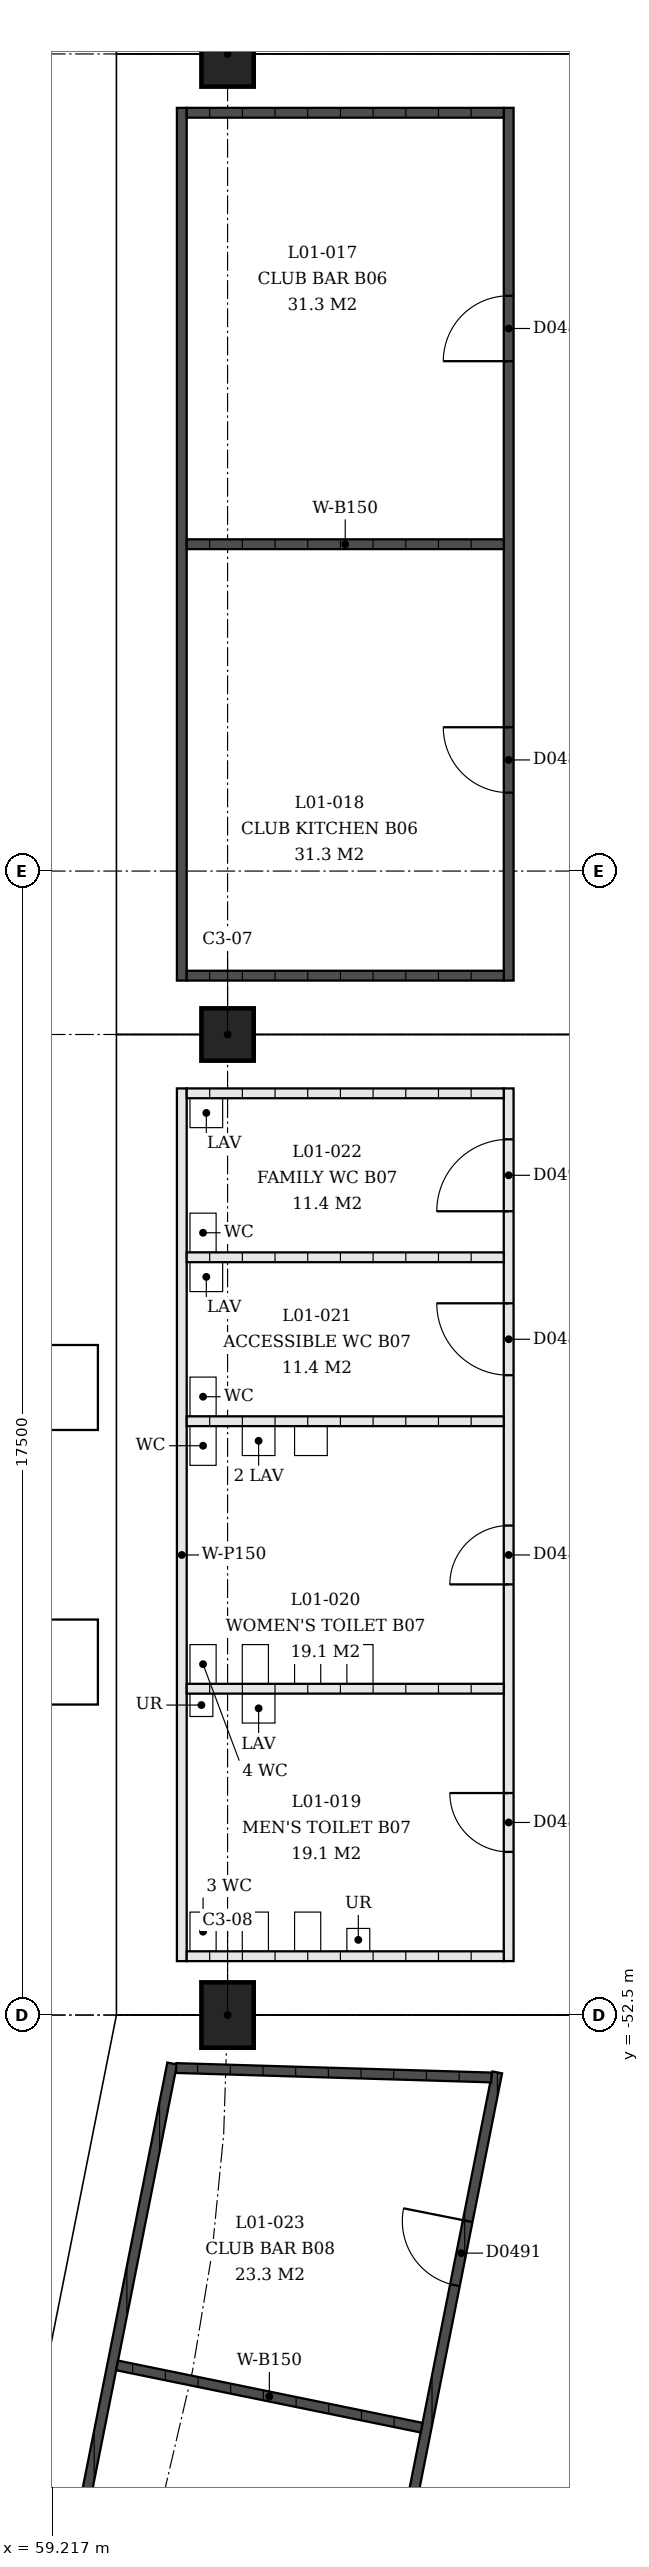
"""IFC4 building model, lengths in metres.
Left out: names, types, materials, properties, quantities, classifications, styles, units other than length and angle.
Written with IfcOpenShell. Run it as: python <this file> out.ifc"""

import sys

from ifc_helpers import new_model, si_unit, direction, frame, frame_2d, origin, origin_2d, place, context, subcontext, project, spatial, rectangle, extrude, element, fill, save


model = new_model("IFC4")
c1 = context("Model", 3, precision=1e-05, world=origin(), true_north=direction((0.0, 1.0)))
c2 = subcontext(c1, "Body", "Model", "MODEL_VIEW")
j1 = project(units=[si_unit("LENGTHUNIT", "METRE"), si_unit("PLANEANGLEUNIT", "RADIAN")], contexts=[c1])
p1 = place(None, origin())
s1 = spatial("IfcSite", under=j1, at=p1, CompositionType="ELEMENT")
p2 = place(p1, origin())
s2 = spatial("IfcBuilding", under=s1, at=p2, CompositionType="ELEMENT")
p3 = place(p2, frame((0.0, 0.0, 4.5)))
s3 = spatial("IfcBuildingStorey", under=s2, at=p3, CompositionType="ELEMENT", Elevation=4.5)
p4 = place(p3, frame((61.9, -22.5, 0.0), z_axis=(0.0, 0.0, 1.0), x_axis=(0.0, 1.0, 0.0)))
e1 = element("IfcColumn", 1, at=p4, inside=s3, PredefinedType="COLUMN", context=c2, shape_type="SweptSolid", body=[
    extrude(rectangle(XDim=1.0, YDim=0.8, at=origin_2d()), origin(), (0.0, 0.0, 1.0), 4.5),
])
p5 = place(p3, frame((61.9, -37.5, 0.0), z_axis=(0.0, 0.0, 1.0), x_axis=(0.0, 1.0, 0.0)))
e2 = element("IfcColumn", 2, at=p5, inside=s3, PredefinedType="COLUMN", context=c2, shape_type="SweptSolid", body=[
    extrude(rectangle(XDim=0.8, YDim=0.8, at=origin_2d()), origin(), (0.0, 0.0, 1.0), 4.5),
])
p6 = place(p3, frame((61.9, -52.5, 0.0), z_axis=(0.0, 0.0, 1.0), x_axis=(0.0, 1.0, 0.0)))
e3 = element("IfcColumn", 3, at=p6, inside=s3, PredefinedType="COLUMN", context=c2, shape_type="SweptSolid", body=[
    extrude(rectangle(XDim=1.0, YDim=0.8, at=origin_2d()), origin(), (0.0, 0.0, 1.0), 4.5),
])
p7 = place(p3, frame((61.2, -23.325, 0.0), z_axis=(0.0, 0.0, 1.0), x_axis=(0.0, -1.0, 0.0)))
e4 = element("IfcWall", 4, at=p7, inside=s3, PredefinedType="SOLIDWALL", context=c2, shape_type="SweptSolid", body=[
    extrude(rectangle(XDim=13.35, YDim=0.15, at=frame_2d((6.675, 0.0))), origin(), (0.0, 0.0, 1.0), 3.0),
])
p8 = place(p3, frame((66.2, -23.325, 0.0), z_axis=(0.0, 0.0, 1.0), x_axis=(0.0, -1.0, 0.0)))
e5 = element("IfcWall", 5, at=p8, inside=s3, PredefinedType="SOLIDWALL", context=c2, shape_type="SweptSolid", body=[
    extrude(rectangle(XDim=13.35, YDim=0.15, at=frame_2d((6.675, 0.0))), origin(), (0.0, 0.0, 1.0), 3.0),
])
p9 = place(p8, frame((2.875, 0.0, 0.0)))
e6 = element("IfcOpeningElement", 6, at=p9, cuts=e5, PredefinedType="OPENING", context=c2, shape_type="SweptSolid", body=[
    extrude(rectangle(XDim=1.0, YDim=2.1, at=frame_2d((0.5, 1.05))), frame((0.0, 0.075, 0.0), z_axis=(0.0, -1.0, 0.0), x_axis=(1.0, 0.0, 0.0)), (0.0, 0.0, 1.0), 0.15),
])
p10 = place(p8, frame((9.475, 0.0, 0.0)))
e7 = element("IfcOpeningElement", 7, at=p10, cuts=e5, PredefinedType="OPENING", context=c2, shape_type="SweptSolid", body=[
    extrude(rectangle(XDim=1.0, YDim=2.1, at=frame_2d((0.5, 1.05))), frame((0.0, 0.075, 0.0), z_axis=(0.0, -1.0, 0.0), x_axis=(1.0, 0.0, 0.0)), (0.0, 0.0, 1.0), 0.15),
])
for number, where, z_axis, x_axis in (
    (8, (61.275, -23.4, 0.0), (0.0, 0.0, 1.0), (1.0, 0.0, 0.0)),
    (9, (61.275, -30.0, 0.0), (0.0, 0.0, 1.0), (1.0, 0.0, 0.0)),
    (10, (61.275, -36.6, 0.0), (0.0, 0.0, 1.0), (1.0, 0.0, 0.0)),
):
    element("IfcWall", number, at=place(p3, frame(where, z_axis=z_axis, x_axis=x_axis)), inside=s3, PredefinedType="SOLIDWALL", context=c2, shape_type="SweptSolid", body=[
        extrude(rectangle(XDim=4.85, YDim=0.15, at=frame_2d((2.425, 0.0))), origin(), (0.0, 0.0, 1.0), 3.0),
    ])
p11 = place(p3, frame((61.2, -51.675, 0.0), z_axis=(0.0, 0.0, 1.0), x_axis=(0.0, 1.0, 0.0)))
e11 = element("IfcWall", 11, at=p11, inside=s3, PredefinedType="PARTITIONING", context=c2, shape_type="SweptSolid", body=[
    extrude(rectangle(XDim=13.35, YDim=0.15, at=frame_2d((6.675, 0.0))), origin(), (0.0, 0.0, 1.0), 3.0),
])
p12 = place(p3, frame((66.2, -51.675, 0.0), z_axis=(0.0, 0.0, 1.0), x_axis=(0.0, 1.0, 0.0)))
e12 = element("IfcWall", 12, at=p12, inside=s3, PredefinedType="PARTITIONING", context=c2, shape_type="SweptSolid", body=[
    extrude(rectangle(XDim=13.35, YDim=0.15, at=frame_2d((6.675, 0.0))), origin(), (0.0, 0.0, 1.0), 3.0),
])
p13 = place(p12, frame((1.671, 0.0, 0.0)))
e13 = element("IfcOpeningElement", 13, at=p13, cuts=e12, PredefinedType="OPENING", context=c2, shape_type="SweptSolid", body=[
    extrude(rectangle(XDim=0.9, YDim=2.1, at=frame_2d((0.45, 1.05))), frame((0.0, 0.075, 0.0), z_axis=(0.0, -1.0, 0.0), x_axis=(1.0, 0.0, 0.0)), (0.0, 0.0, 1.0), 0.15),
])
p14 = place(p12, frame((5.763, 0.0, 0.0)))
e14 = element("IfcOpeningElement", 14, at=p14, cuts=e12, PredefinedType="OPENING", context=c2, shape_type="SweptSolid", body=[
    extrude(rectangle(XDim=0.9, YDim=2.1, at=frame_2d((0.45, 1.05))), frame((0.0, 0.075, 0.0), z_axis=(0.0, -1.0, 0.0), x_axis=(1.0, 0.0, 0.0)), (0.0, 0.0, 1.0), 0.15),
])
p15 = place(p12, frame((8.963, 0.0, 0.0)))
e15 = element("IfcOpeningElement", 15, at=p15, cuts=e12, PredefinedType="OPENING", context=c2, shape_type="SweptSolid", body=[
    extrude(rectangle(XDim=1.1, YDim=2.1, at=frame_2d((0.55, 1.05))), frame((0.0, 0.075, 0.0), z_axis=(0.0, -1.0, 0.0), x_axis=(1.0, 0.0, 0.0)), (0.0, 0.0, 1.0), 0.15),
])
p16 = place(p12, frame((11.471, 0.0, 0.0)))
e16 = element("IfcOpeningElement", 16, at=p16, cuts=e12, PredefinedType="OPENING", context=c2, shape_type="SweptSolid", body=[
    extrude(rectangle(XDim=1.1, YDim=2.1, at=frame_2d((0.55, 1.05))), frame((0.0, 0.075, 0.0), z_axis=(0.0, -1.0, 0.0), x_axis=(1.0, 0.0, 0.0)), (0.0, 0.0, 1.0), 0.15),
])
for number, where, z_axis, x_axis in (
    (17, (61.275, -51.6, 0.0), (0.0, 0.0, 1.0), (1.0, 0.0, 0.0)),
    (18, (61.275, -47.508, 0.0), (0.0, 0.0, 1.0), (1.0, 0.0, 0.0)),
    (19, (61.275, -43.416, 0.0), (0.0, 0.0, 1.0), (1.0, 0.0, 0.0)),
    (20, (61.275, -40.908, 0.0), (0.0, 0.0, 1.0), (1.0, 0.0, 0.0)),
    (21, (61.275, -38.4, 0.0), (0.0, 0.0, 1.0), (1.0, 0.0, 0.0)),
):
    element("IfcWall", number, at=place(p3, frame(where, z_axis=z_axis, x_axis=x_axis)), inside=s3, PredefinedType="PARTITIONING", context=c2, shape_type="SweptSolid", body=[
        extrude(rectangle(XDim=4.85, YDim=0.15, at=frame_2d((2.425, 0.0))), origin(), (0.0, 0.0, 1.0), 3.0),
    ])
p17 = place(p3, frame((61.052, -53.241, 0.0), z_axis=(0.0, 0.0, 1.0), x_axis=(-0.195075759432, -0.980788176969, 0.0)))
e22 = element("IfcWall", 22, at=p17, inside=s3, PredefinedType="SOLIDWALL", context=c2, shape_type="SweptSolid", body=[
    extrude(rectangle(XDim=9.388, YDim=0.15, at=frame_2d((4.694, 0.0))), origin(), (0.0, 0.0, 1.0), 3.0),
])
p18 = place(p3, frame((66.025, -53.377, 0.0), z_axis=(0.0, 0.0, 1.0), x_axis=(-0.195076764682, -0.980787977027, 0.0)))
e23 = element("IfcWall", 23, at=p18, inside=s3, PredefinedType="SOLIDWALL", context=c2, shape_type="SweptSolid", body=[
    extrude(rectangle(XDim=11.114, YDim=0.15, at=frame_2d((5.557, 0.0))), origin(), (0.0, 0.0, 1.0), 3.0),
])
p19 = place(p18, frame((2.319, 0.0, 0.0)))
e24 = element("IfcOpeningElement", 24, at=p19, cuts=e23, PredefinedType="OPENING", context=c2, shape_type="SweptSolid", body=[
    extrude(rectangle(XDim=1.0, YDim=2.1, at=frame_2d((0.5, 1.05))), frame((0.0, 0.075, 0.0), z_axis=(0.0, -1.0, 0.0), x_axis=(1.0, 0.0, 0.0)), (0.0, 0.0, 1.0), 0.15),
])
p20 = place(p18, frame((7.794, 0.0, 0.0)))
e25 = element("IfcOpeningElement", 25, at=p20, cuts=e23, PredefinedType="OPENING", context=c2, shape_type="SweptSolid", body=[
    extrude(rectangle(XDim=1.0, YDim=2.1, at=frame_2d((0.5, 1.05))), frame((0.0, 0.075, 0.0), z_axis=(0.0, -1.0, 0.0), x_axis=(1.0, 0.0, 0.0)), (0.0, 0.0, 1.0), 0.15),
])
p21 = place(p3, frame((61.114, -53.311, 0.0), z_axis=(0.0, 0.0, 1.0), x_axis=(0.999552485488, -0.02991368842, 0.0)))
e26 = element("IfcWall", 26, at=p21, inside=s3, PredefinedType="SOLIDWALL", context=c2, shape_type="SweptSolid", body=[
    extrude(rectangle(XDim=4.823, YDim=0.15, at=frame_2d((2.412, 0.0))), origin(), (0.0, 0.0, 1.0), 3.0),
])
p22 = place(p3, frame((60.209, -57.859, 0.0), z_axis=(0.0, 0.0, 1.0), x_axis=(0.979720657149, -0.200368245875, 0.0)))
e27 = element("IfcWall", 27, at=p22, inside=s3, PredefinedType="SOLIDWALL", context=c2, shape_type="SweptSolid", body=[
    extrude(rectangle(XDim=4.757, YDim=0.15, at=frame_2d((2.378, 0.0))), origin(), (0.0, 0.0, 1.0), 3.0),
])
p23 = place(p9, origin())
e28 = element("IfcDoor", 28, at=p23, inside=s3, OperationType="SINGLE_SWING_RIGHT", PredefinedType="DOOR", context=c2, shape_type="SweptSolid", body=[
    extrude(rectangle(XDim=1.0, YDim=2.1, at=frame_2d((0.5, 1.05))), frame((0.0, 0.025, 0.0), z_axis=(0.0, -1.0, 0.0), x_axis=(1.0, 0.0, 0.0)), (0.0, 0.0, 1.0), 0.05),
])
fill(e6, e28)
p24 = place(p10, origin())
e29 = element("IfcDoor", 29, at=p24, inside=s3, OperationType="SINGLE_SWING_LEFT", PredefinedType="DOOR", context=c2, shape_type="SweptSolid", body=[
    extrude(rectangle(XDim=1.0, YDim=2.1, at=frame_2d((0.5, 1.05))), frame((0.0, 0.025, 0.0), z_axis=(0.0, -1.0, 0.0), x_axis=(1.0, 0.0, 0.0)), (0.0, 0.0, 1.0), 0.05),
])
fill(e7, e29)
p25 = place(p13, origin())
e30 = element("IfcDoor", 30, at=p25, inside=s3, OperationType="SINGLE_SWING_LEFT", PredefinedType="DOOR", context=c2, shape_type="SweptSolid", body=[
    extrude(rectangle(XDim=0.9, YDim=2.1, at=frame_2d((0.45, 1.05))), frame((0.0, 0.025, 0.0), z_axis=(0.0, -1.0, 0.0), x_axis=(1.0, 0.0, 0.0)), (0.0, 0.0, 1.0), 0.05),
])
fill(e13, e30)
p26 = place(p14, origin())
e31 = element("IfcDoor", 31, at=p26, inside=s3, OperationType="SINGLE_SWING_RIGHT", PredefinedType="DOOR", context=c2, shape_type="SweptSolid", body=[
    extrude(rectangle(XDim=0.9, YDim=2.1, at=frame_2d((0.45, 1.05))), frame((0.0, 0.025, 0.0), z_axis=(0.0, -1.0, 0.0), x_axis=(1.0, 0.0, 0.0)), (0.0, 0.0, 1.0), 0.05),
])
fill(e14, e31)
p27 = place(p15, origin())
e32 = element("IfcDoor", 32, at=p27, inside=s3, OperationType="SINGLE_SWING_LEFT", PredefinedType="DOOR", context=c2, shape_type="SweptSolid", body=[
    extrude(rectangle(XDim=1.1, YDim=2.1, at=frame_2d((0.55, 1.05))), frame((0.0, 0.025, 0.0), z_axis=(0.0, -1.0, 0.0), x_axis=(1.0, 0.0, 0.0)), (0.0, 0.0, 1.0), 0.05),
])
fill(e15, e32)
p28 = place(p16, origin())
e33 = element("IfcDoor", 33, at=p28, inside=s3, OperationType="SINGLE_SWING_RIGHT", PredefinedType="DOOR", context=c2, shape_type="SweptSolid", body=[
    extrude(rectangle(XDim=1.1, YDim=2.1, at=frame_2d((0.55, 1.05))), frame((0.0, 0.025, 0.0), z_axis=(0.0, -1.0, 0.0), x_axis=(1.0, 0.0, 0.0)), (0.0, 0.0, 1.0), 0.05),
])
fill(e16, e33)
p29 = place(p19, origin())
e34 = element("IfcDoor", 34, at=p29, inside=s3, OperationType="SINGLE_SWING_LEFT", PredefinedType="DOOR", context=c2, shape_type="SweptSolid", body=[
    extrude(rectangle(XDim=1.0, YDim=2.1, at=frame_2d((0.5, 1.05))), frame((0.0, 0.025, 0.0), z_axis=(0.0, -1.0, 0.0), x_axis=(1.0, 0.0, 0.0)), (0.0, 0.0, 1.0), 0.05),
])
fill(e24, e34)
save(model, sys.argv[1])
